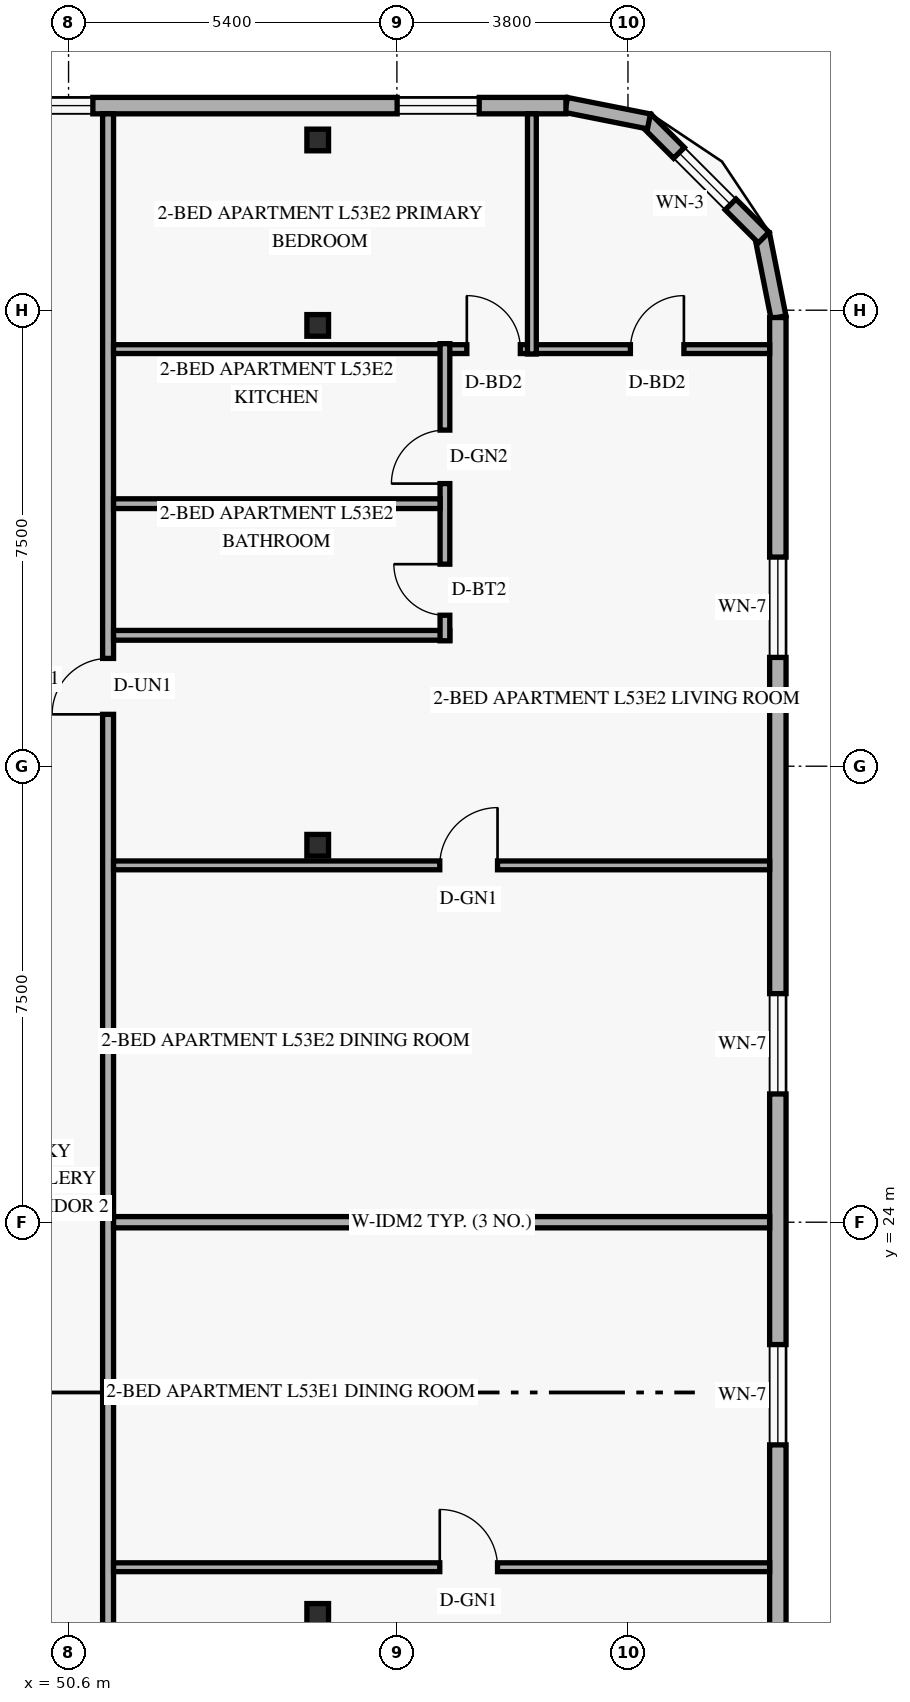
"""IFC4 building model, lengths in metres.
Left out: names, types, materials, properties, quantities, classifications, styles, units other than length and angle.
Written with IfcOpenShell. Run it as: python <this file> out.ifc"""

import sys

from ifc_helpers import new_model, si_unit, direction, frame, frame_2d, origin, origin_2d, place, context, subcontext, project, spatial, rectangle, hollow_rectangle, extrude, element, fill, save


model = new_model("IFC4")
c1 = context("Model", 3, precision=1e-05, world=origin(), true_north=direction((0.0, 1.0)))
c2 = subcontext(c1, "Body", "Model", "MODEL_VIEW")
j1 = project(units=[si_unit("LENGTHUNIT", "METRE"), si_unit("PLANEANGLEUNIT", "RADIAN")], contexts=[c1])
p1 = place(None, origin())
s1 = spatial("IfcSite", under=j1, at=p1, CompositionType="ELEMENT")
p2 = place(p1, origin())
s2 = spatial("IfcBuilding", under=s1, at=p2, CompositionType="ELEMENT")
p3 = place(p2, frame((0.0, 0.0, 205.8)))
s3 = spatial("IfcBuildingStorey", under=s2, at=p3, CompositionType="ELEMENT", Elevation=205.8)
for number, where, z_axis, x_axis in (
    (1, (54.593, 17.55, 0.0), (0.058, 0.0, 0.998), (0.0, 1.0, 0.0)),
    (2, (54.593, 30.2, 0.0), (0.058, 0.0, 0.998), (0.0, 1.0, 0.0)),
    (3, (54.593, 38.75, 0.0), (0.058, 0.0, 0.998), (0.0, 1.0, 0.0)),
    (4, (54.593, 41.8, 0.0), (0.058, 0.0, 0.998), (0.0, 1.0, 0.0)),
):
    element("IfcColumn", number, at=place(p3, frame(where, z_axis=z_axis, x_axis=x_axis)), inside=s3, PredefinedType="COLUMN", context=c2, shape_type="SweptSolid", body=[
        extrude(hollow_rectangle(XDim=0.356, YDim=0.356, WallThickness=0.016, at=origin_2d()), origin(), (0.0, 0.0, 1.0), 3.606),
    ])
p4 = place(p3, frame((62.276, 38.884, 0.0), z_axis=(0.0, 0.0, 1.0), x_axis=(-0.195135625965, 0.9807762678, 0.0)))
e5 = element("IfcWall", 5, at=p4, inside=s3, PredefinedType="SOLIDWALL", context=c2, shape_type="SweptSolid", body=[
    extrude(rectangle(XDim=1.389, YDim=0.25, at=frame_2d((0.694, 0.0))), origin(), (0.0, 0.0, 1.0), 3.36),
])
p5 = place(p3, frame((62.032, 40.195, 0.0), z_axis=(0.0, 0.0, 1.0), x_axis=(-0.707106781187, 0.707106781187, 0.0)))
e6 = element("IfcWall", 6, at=p5, inside=s3, PredefinedType="SOLIDWALL", context=c2, shape_type="SweptSolid", body=[
    extrude(rectangle(XDim=2.739, YDim=0.25, at=frame_2d((1.37, 0.0))), origin(), (0.0, 0.0, 1.0), 3.36),
])
p6 = place(p5, frame((0.77, 0.0, 0.85)))
e7 = element("IfcOpeningElement", 7, at=p6, cuts=e6, PredefinedType="OPENING", context=c2, shape_type="SweptSolid", body=[
    extrude(rectangle(XDim=1.2, YDim=1.5, at=frame_2d((0.6, 0.75))), frame((0.0, 0.135, 0.0), z_axis=(0.0, -1.0, 0.0), x_axis=(1.0, 0.0, 0.0)), (0.0, 0.0, 1.0), 0.27),
])
p7 = place(p3, frame((60.146, 42.105, 0.0), z_axis=(0.0, 0.0, 1.0), x_axis=(-0.980809899341, 0.19496651342, 0.0)))
e8 = element("IfcWall", 8, at=p7, inside=s3, PredefinedType="SOLIDWALL", context=c2, shape_type="SweptSolid", body=[
    extrude(rectangle(XDim=1.389, YDim=0.25, at=frame_2d((0.694, 0.0))), origin(), (0.0, 0.0, 1.0), 3.36),
])
p8 = place(p3, frame((62.265, 9.12, 0.0), z_axis=(0.0, 0.0, 1.0), x_axis=(0.0, 1.0, 0.0)))
e9 = element("IfcWall", 9, at=p8, inside=s3, PredefinedType="SOLIDWALL", context=c2, shape_type="SweptSolid", body=[
    extrude(rectangle(XDim=29.76, YDim=0.27, at=frame_2d((14.88, 0.0))), origin(), (0.0, 0.0, 1.0), 3.36),
])
p9 = place(p8, frame((0.385, 0.0, 0.85)))
e10 = element("IfcOpeningElement", 10, at=p9, cuts=e9, PredefinedType="OPENING", context=c2, shape_type="SweptSolid", body=[
    extrude(rectangle(XDim=1.2, YDim=1.5, at=frame_2d((0.6, 0.75))), frame((0.0, 0.145, 0.0), z_axis=(0.0, -1.0, 0.0), x_axis=(1.0, 0.0, 0.0)), (0.0, 0.0, 1.0), 0.29),
])
p10 = place(p8, frame((4.763, 0.0, 0.85)))
e11 = element("IfcOpeningElement", 11, at=p10, cuts=e9, PredefinedType="OPENING", context=c2, shape_type="SweptSolid", body=[
    extrude(rectangle(XDim=1.65, YDim=1.6, at=frame_2d((0.825, 0.8))), frame((0.0, 0.145, 0.0), z_axis=(0.0, -1.0, 0.0), x_axis=(1.0, 0.0, 0.0)), (0.0, 0.0, 1.0), 0.29),
])
p11 = place(p8, frame((11.218, 0.0, 0.85)))
e12 = element("IfcOpeningElement", 12, at=p11, cuts=e9, PredefinedType="OPENING", context=c2, shape_type="SweptSolid", body=[
    extrude(rectangle(XDim=1.65, YDim=1.6, at=frame_2d((0.825, 0.8))), frame((0.0, 0.145, 0.0), z_axis=(0.0, -1.0, 0.0), x_axis=(1.0, 0.0, 0.0)), (0.0, 0.0, 1.0), 0.29),
])
p12 = place(p8, frame((16.99, 0.0, 0.85)))
e13 = element("IfcOpeningElement", 13, at=p12, cuts=e9, PredefinedType="OPENING", context=c2, shape_type="SweptSolid", body=[
    extrude(rectangle(XDim=1.65, YDim=1.6, at=frame_2d((0.825, 0.8))), frame((0.0, 0.145, 0.0), z_axis=(0.0, -1.0, 0.0), x_axis=(1.0, 0.0, 0.0)), (0.0, 0.0, 1.0), 0.29),
])
p13 = place(p8, frame((24.17, 0.0, 0.85)))
e14 = element("IfcOpeningElement", 14, at=p13, cuts=e9, PredefinedType="OPENING", context=c2, shape_type="SweptSolid", body=[
    extrude(rectangle(XDim=1.65, YDim=1.6, at=frame_2d((0.825, 0.8))), frame((0.0, 0.145, 0.0), z_axis=(0.0, -1.0, 0.0), x_axis=(1.0, 0.0, 0.0)), (0.0, 0.0, 1.0), 0.29),
])
p14 = place(p3, frame((58.78, 42.365, 0.0), z_axis=(0.0, 0.0, 1.0), x_axis=(-1.0, 0.0, 0.0)))
e15 = element("IfcWall", 15, at=p14, inside=s3, PredefinedType="SOLIDWALL", context=c2, shape_type="SweptSolid", body=[
    extrude(rectangle(XDim=32.96, YDim=0.27, at=frame_2d((16.48, 0.0))), origin(), (0.0, 0.0, 1.0), 3.36),
])
p15 = place(p14, frame((27.815, 0.0, 0.85)))
e16 = element("IfcOpeningElement", 16, at=p15, cuts=e15, PredefinedType="OPENING", context=c2, shape_type="SweptSolid", body=[
    extrude(rectangle(XDim=1.35, YDim=1.55, at=frame_2d((0.675, 0.775))), frame((0.0, 0.145, 0.0), z_axis=(0.0, -1.0, 0.0), x_axis=(1.0, 0.0, 0.0)), (0.0, 0.0, 1.0), 0.29),
])
p16 = place(p14, frame((17.265, 0.0, 0.85)))
e17 = element("IfcOpeningElement", 17, at=p16, cuts=e15, PredefinedType="OPENING", context=c2, shape_type="SweptSolid", body=[
    extrude(rectangle(XDim=1.35, YDim=1.55, at=frame_2d((0.675, 0.775))), frame((0.0, 0.145, 0.0), z_axis=(0.0, -1.0, 0.0), x_axis=(1.0, 0.0, 0.0)), (0.0, 0.0, 1.0), 0.29),
])
p17 = place(p14, frame((12.934, 0.0, 0.85)))
e18 = element("IfcOpeningElement", 18, at=p17, cuts=e15, PredefinedType="OPENING", context=c2, shape_type="SweptSolid", body=[
    extrude(rectangle(XDim=1.35, YDim=1.55, at=frame_2d((0.675, 0.775))), frame((0.0, 0.145, 0.0), z_axis=(0.0, -1.0, 0.0), x_axis=(1.0, 0.0, 0.0)), (0.0, 0.0, 1.0), 0.29),
])
p18 = place(p14, frame((7.78, 0.0, 0.85)))
e19 = element("IfcOpeningElement", 19, at=p18, cuts=e15, PredefinedType="OPENING", context=c2, shape_type="SweptSolid", body=[
    extrude(rectangle(XDim=1.35, YDim=1.55, at=frame_2d((0.675, 0.775))), frame((0.0, 0.145, 0.0), z_axis=(0.0, -1.0, 0.0), x_axis=(1.0, 0.0, 0.0)), (0.0, 0.0, 1.0), 0.29),
])
p19 = place(p14, frame((1.426, 0.0, 0.85)))
e20 = element("IfcOpeningElement", 20, at=p19, cuts=e15, PredefinedType="OPENING", context=c2, shape_type="SweptSolid", body=[
    extrude(rectangle(XDim=1.35, YDim=1.55, at=frame_2d((0.675, 0.775))), frame((0.0, 0.145, 0.0), z_axis=(0.0, -1.0, 0.0), x_axis=(1.0, 0.0, 0.0)), (0.0, 0.0, 1.0), 0.29),
])
p20 = place(p3, frame((51.25, 5.77, 0.0), z_axis=(0.0, 0.0, 1.0), x_axis=(0.0, 1.0, 0.0)))
e21 = element("IfcWall", 21, at=p20, inside=s3, PredefinedType="STANDARD", context=c2, shape_type="SweptSolid", body=[
    extrude(rectangle(XDim=36.46, YDim=0.18, at=frame_2d((18.23, 0.0))), origin(), (0.0, 0.0, 1.0), 2.803),
])
p21 = place(p20, frame((10.358, 0.0, 0.0)))
e22 = element("IfcOpeningElement", 22, at=p21, cuts=e21, PredefinedType="OPENING", context=c2, shape_type="SweptSolid", body=[
    extrude(rectangle(XDim=0.92, YDim=2.15, at=frame_2d((0.46, 1.075))), frame((0.0, 0.1, 0.0), z_axis=(0.0, -1.0, 0.0), x_axis=(1.0, 0.0, 0.0)), (0.0, 0.0, 1.0), 0.2),
])
p22 = place(p20, frame((26.583, 0.0, 0.0)))
e23 = element("IfcOpeningElement", 23, at=p22, cuts=e21, PredefinedType="OPENING", context=c2, shape_type="SweptSolid", body=[
    extrude(rectangle(XDim=0.92, YDim=2.15, at=frame_2d((0.46, 1.075))), frame((0.0, 0.1, 0.0), z_axis=(0.0, -1.0, 0.0), x_axis=(1.0, 0.0, 0.0)), (0.0, 0.0, 1.0), 0.2),
])
p23 = place(p3, frame((51.34, 18.326, 0.0), z_axis=(0.0, 0.0, 1.0), x_axis=(1.0, 0.0, 0.0)))
e24 = element("IfcWall", 24, at=p23, inside=s3, PredefinedType="PARTITIONING", context=c2, shape_type="SweptSolid", body=[
    extrude(rectangle(XDim=10.79, YDim=0.145, at=frame_2d((5.395, 0.0))), origin(), (0.0, 0.0, 1.0), 2.879),
])
p24 = place(p23, frame((5.365, 0.0, 0.0)))
e25 = element("IfcOpeningElement", 25, at=p24, cuts=e24, PredefinedType="OPENING", context=c2, shape_type="SweptSolid", body=[
    extrude(rectangle(XDim=0.95, YDim=2.15, at=frame_2d((0.475, 1.075))), frame((0.0, 0.083, 0.0), z_axis=(0.0, -1.0, 0.0), x_axis=(1.0, 0.0, 0.0)), (0.0, 0.0, 1.0), 0.165),
])
p25 = place(p3, frame((51.34, 24.0, 0.0), z_axis=(0.0, 0.0, 1.0), x_axis=(1.0, 0.0, 0.0)))
e26 = element("IfcWall", 26, at=p25, inside=s3, PredefinedType="PARTITIONING", context=c2, shape_type="SweptSolid", body=[
    extrude(rectangle(XDim=10.79, YDim=0.185, at=frame_2d((5.395, 0.0))), origin(), (0.0, 0.0, 1.0), 2.879),
])
p26 = place(p3, frame((51.34, 38.36, 0.0), z_axis=(0.0, 0.0, 1.0), x_axis=(1.0, 0.0, 0.0)))
e27 = element("IfcWall", 27, at=p26, inside=s3, PredefinedType="PARTITIONING", context=c2, shape_type="SweptSolid", body=[
    extrude(rectangle(XDim=10.79, YDim=0.145, at=frame_2d((5.395, 0.0))), origin(), (0.0, 0.0, 1.0), 2.879),
])
p27 = place(p26, frame((5.81, 0.0, 0.0)))
e28 = element("IfcOpeningElement", 28, at=p27, cuts=e27, PredefinedType="OPENING", context=c2, shape_type="SweptSolid", body=[
    extrude(rectangle(XDim=0.88, YDim=2.14, at=frame_2d((0.44, 1.07))), frame((0.0, 0.083, 0.0), z_axis=(0.0, -1.0, 0.0), x_axis=(1.0, 0.0, 0.0)), (0.0, 0.0, 1.0), 0.165),
])
p28 = place(p26, frame((8.5, 0.0, 0.0)))
e29 = element("IfcOpeningElement", 29, at=p28, cuts=e27, PredefinedType="OPENING", context=c2, shape_type="SweptSolid", body=[
    extrude(rectangle(XDim=0.88, YDim=2.14, at=frame_2d((0.44, 1.07))), frame((0.0, 0.083, 0.0), z_axis=(0.0, -1.0, 0.0), x_axis=(1.0, 0.0, 0.0)), (0.0, 0.0, 1.0), 0.165),
])
p29 = place(p3, frame((51.34, 33.653, 0.0), z_axis=(0.0, 0.0, 1.0), x_axis=(1.0, 0.0, 0.0)))
e30 = element("IfcWall", 30, at=p29, inside=s3, PredefinedType="PLUMBINGWALL", context=c2, shape_type="SweptSolid", body=[
    extrude(rectangle(XDim=5.53, YDim=0.16, at=frame_2d((2.765, 0.0))), origin(), (0.0, 0.0, 1.0), 2.879),
])
p30 = place(p3, frame((56.79, 33.563, 0.0), z_axis=(0.0, 0.0, 1.0), x_axis=(0.0, 1.0, 0.0)))
e31 = element("IfcWall", 31, at=p30, inside=s3, PredefinedType="PLUMBINGWALL", context=c2, shape_type="SweptSolid", body=[
    extrude(rectangle(XDim=4.887, YDim=0.16, at=frame_2d((2.443, 0.0))), origin(), (0.0, 0.0, 1.0), 3.36),
])
p31 = place(p30, frame((0.42, 0.0, 0.0)))
e32 = element("IfcOpeningElement", 32, at=p31, cuts=e31, PredefinedType="OPENING", context=c2, shape_type="SweptSolid", body=[
    extrude(rectangle(XDim=0.84, YDim=2.12, at=frame_2d((0.42, 1.06))), frame((0.0, 0.09, 0.0), z_axis=(0.0, -1.0, 0.0), x_axis=(1.0, 0.0, 0.0)), (0.0, 0.0, 1.0), 0.18),
])
p32 = place(p30, frame((2.585, 0.0, 0.0)))
e33 = element("IfcOpeningElement", 33, at=p32, cuts=e31, PredefinedType="OPENING", context=c2, shape_type="SweptSolid", body=[
    extrude(rectangle(XDim=0.88, YDim=2.12, at=frame_2d((0.44, 1.06))), frame((0.0, 0.09, 0.0), z_axis=(0.0, -1.0, 0.0), x_axis=(1.0, 0.0, 0.0)), (0.0, 0.0, 1.0), 0.18),
])
p33 = place(p3, frame((51.34, 35.818, 0.0), z_axis=(0.0, 0.0, 1.0), x_axis=(1.0, 0.0, 0.0)))
e34 = element("IfcWall", 34, at=p33, inside=s3, PredefinedType="PLUMBINGWALL", context=c2, shape_type="SweptSolid", body=[
    extrude(rectangle(XDim=5.37, YDim=0.16, at=frame_2d((2.685, 0.0))), origin(), (0.0, 0.0, 1.0), 2.879),
])
p34 = place(p3, frame((51.34, 29.869, 0.0), z_axis=(0.0, 0.0, 1.0), x_axis=(1.0, 0.0, 0.0)))
e35 = element("IfcWall", 35, at=p34, inside=s3, PredefinedType="PARTITIONING", context=c2, shape_type="SweptSolid", body=[
    extrude(rectangle(XDim=10.79, YDim=0.145, at=frame_2d((5.395, 0.0))), origin(), (0.0, 0.0, 1.0), 2.879),
])
p35 = place(p34, frame((5.365, 0.0, 0.0)))
e36 = element("IfcOpeningElement", 36, at=p35, cuts=e35, PredefinedType="OPENING", context=c2, shape_type="SweptSolid", body=[
    extrude(rectangle(XDim=0.95, YDim=2.15, at=frame_2d((0.475, 1.075))), frame((0.0, 0.083, 0.0), z_axis=(0.0, -1.0, 0.0), x_axis=(1.0, 0.0, 0.0)), (0.0, 0.0, 1.0), 0.165),
])
p36 = place(p3, frame((58.22, 38.28, 0.0), z_axis=(0.0, 0.0, 1.0), x_axis=(0.0, 1.0, 0.0)))
e37 = element("IfcWall", 37, at=p36, inside=s3, PredefinedType="PARTITIONING", context=c2, shape_type="SweptSolid", body=[
    extrude(rectangle(XDim=3.95, YDim=0.145, at=frame_2d((1.975, 0.0))), origin(), (0.0, 0.0, 1.0), 3.36),
])
p37 = place(p6, origin())
e38 = element("IfcWindow", 38, at=p37, inside=s3, PartitioningType="SINGLE_PANEL", PredefinedType="WINDOW", context=c2, shape_type="SweptSolid", body=[
    extrude(rectangle(XDim=1.2, YDim=1.5, at=frame_2d((0.6, 0.75))), frame((0.0, 0.03, 0.0), z_axis=(0.0, -1.0, 0.0), x_axis=(1.0, 0.0, 0.0)), (0.0, 0.0, 1.0), 0.06),
])
fill(e7, e38)
p38 = place(p11, origin())
e39 = element("IfcWindow", 39, at=p38, inside=s3, PartitioningType="SINGLE_PANEL", PredefinedType="WINDOW", context=c2, shape_type="SweptSolid", body=[
    extrude(rectangle(XDim=1.65, YDim=1.6, at=frame_2d((0.825, 0.8))), frame((0.0, 0.03, 0.0), z_axis=(0.0, -1.0, 0.0), x_axis=(1.0, 0.0, 0.0)), (0.0, 0.0, 1.0), 0.06),
])
fill(e12, e39)
p39 = place(p12, origin())
e40 = element("IfcWindow", 40, at=p39, inside=s3, PartitioningType="SINGLE_PANEL", PredefinedType="WINDOW", context=c2, shape_type="SweptSolid", body=[
    extrude(rectangle(XDim=1.65, YDim=1.6, at=frame_2d((0.825, 0.8))), frame((0.0, 0.03, 0.0), z_axis=(0.0, -1.0, 0.0), x_axis=(1.0, 0.0, 0.0)), (0.0, 0.0, 1.0), 0.06),
])
fill(e13, e40)
p40 = place(p13, origin())
e41 = element("IfcWindow", 41, at=p40, inside=s3, PartitioningType="SINGLE_PANEL", PredefinedType="WINDOW", context=c2, shape_type="SweptSolid", body=[
    extrude(rectangle(XDim=1.65, YDim=1.6, at=frame_2d((0.825, 0.8))), frame((0.0, 0.03, 0.0), z_axis=(0.0, -1.0, 0.0), x_axis=(1.0, 0.0, 0.0)), (0.0, 0.0, 1.0), 0.06),
])
fill(e14, e41)
p41 = place(p18, origin())
e42 = element("IfcWindow", 42, at=p41, inside=s3, PartitioningType="SINGLE_PANEL", PredefinedType="WINDOW", context=c2, shape_type="SweptSolid", body=[
    extrude(rectangle(XDim=1.35, YDim=1.55, at=frame_2d((0.675, 0.775))), frame((0.0, 0.03, 0.0), z_axis=(0.0, -1.0, 0.0), x_axis=(1.0, 0.0, 0.0)), (0.0, 0.0, 1.0), 0.06),
])
fill(e19, e42)
p42 = place(p19, origin())
e43 = element("IfcWindow", 43, at=p42, inside=s3, PartitioningType="SINGLE_PANEL", PredefinedType="WINDOW", context=c2, shape_type="SweptSolid", body=[
    extrude(rectangle(XDim=1.35, YDim=1.55, at=frame_2d((0.675, 0.775))), frame((0.0, 0.03, 0.0), z_axis=(0.0, -1.0, 0.0), x_axis=(1.0, 0.0, 0.0)), (0.0, 0.0, 1.0), 0.06),
])
fill(e20, e43)
p43 = place(p24, origin())
e44 = element("IfcDoor", 44, at=p43, inside=s3, OperationType="SINGLE_SWING_LEFT", PredefinedType="DOOR", context=c2, shape_type="SweptSolid", body=[
    extrude(rectangle(XDim=0.95, YDim=2.15, at=frame_2d((0.475, 1.075))), frame((0.0, 0.025, 0.0), z_axis=(0.0, -1.0, 0.0), x_axis=(1.0, 0.0, 0.0)), (0.0, 0.0, 1.0), 0.05),
])
fill(e25, e44)
p44 = place(p35, origin())
e45 = element("IfcDoor", 45, at=p44, inside=s3, OperationType="SINGLE_SWING_RIGHT", PredefinedType="DOOR", context=c2, shape_type="SweptSolid", body=[
    extrude(rectangle(XDim=0.95, YDim=2.15, at=frame_2d((0.475, 1.075))), frame((0.0, 0.025, 0.0), z_axis=(0.0, -1.0, 0.0), x_axis=(1.0, 0.0, 0.0)), (0.0, 0.0, 1.0), 0.05),
])
fill(e36, e45)
p45 = place(p22, origin())
e46 = element("IfcDoor", 46, at=p45, inside=s3, OperationType="SINGLE_SWING_LEFT", PredefinedType="DOOR", context=c2, shape_type="SweptSolid", body=[
    extrude(rectangle(XDim=0.92, YDim=2.15, at=frame_2d((0.46, 1.075))), frame((0.0, 0.025, 0.0), z_axis=(0.0, -1.0, 0.0), x_axis=(1.0, 0.0, 0.0)), (0.0, 0.0, 1.0), 0.05),
])
fill(e23, e46)
p46 = place(p31, origin())
e47 = element("IfcDoor", 47, at=p46, inside=s3, OperationType="SINGLE_SWING_RIGHT", PredefinedType="DOOR", context=c2, shape_type="SweptSolid", body=[
    extrude(rectangle(XDim=0.84, YDim=2.12, at=frame_2d((0.42, 1.06))), frame((0.0, 0.025, 0.0), z_axis=(0.0, -1.0, 0.0), x_axis=(1.0, 0.0, 0.0)), (0.0, 0.0, 1.0), 0.05),
])
fill(e32, e47)
p47 = place(p32, origin())
e48 = element("IfcDoor", 48, at=p47, inside=s3, OperationType="SINGLE_SWING_LEFT", PredefinedType="DOOR", context=c2, shape_type="SweptSolid", body=[
    extrude(rectangle(XDim=0.88, YDim=2.12, at=frame_2d((0.44, 1.06))), frame((0.0, 0.025, 0.0), z_axis=(0.0, -1.0, 0.0), x_axis=(1.0, 0.0, 0.0)), (0.0, 0.0, 1.0), 0.05),
])
fill(e33, e48)
p48 = place(p27, origin())
e49 = element("IfcDoor", 49, at=p48, inside=s3, OperationType="SINGLE_SWING_LEFT", PredefinedType="DOOR", context=c2, shape_type="SweptSolid", body=[
    extrude(rectangle(XDim=0.88, YDim=2.14, at=frame_2d((0.44, 1.07))), frame((0.0, 0.025, 0.0), z_axis=(0.0, -1.0, 0.0), x_axis=(1.0, 0.0, 0.0)), (0.0, 0.0, 1.0), 0.05),
])
fill(e28, e49)
p49 = place(p28, origin())
e50 = element("IfcDoor", 50, at=p49, inside=s3, OperationType="SINGLE_SWING_RIGHT", PredefinedType="DOOR", context=c2, shape_type="SweptSolid", body=[
    extrude(rectangle(XDim=0.88, YDim=2.14, at=frame_2d((0.44, 1.07))), frame((0.0, 0.025, 0.0), z_axis=(0.0, -1.0, 0.0), x_axis=(1.0, 0.0, 0.0)), (0.0, 0.0, 1.0), 0.05),
])
fill(e29, e50)
save(model, sys.argv[1])
